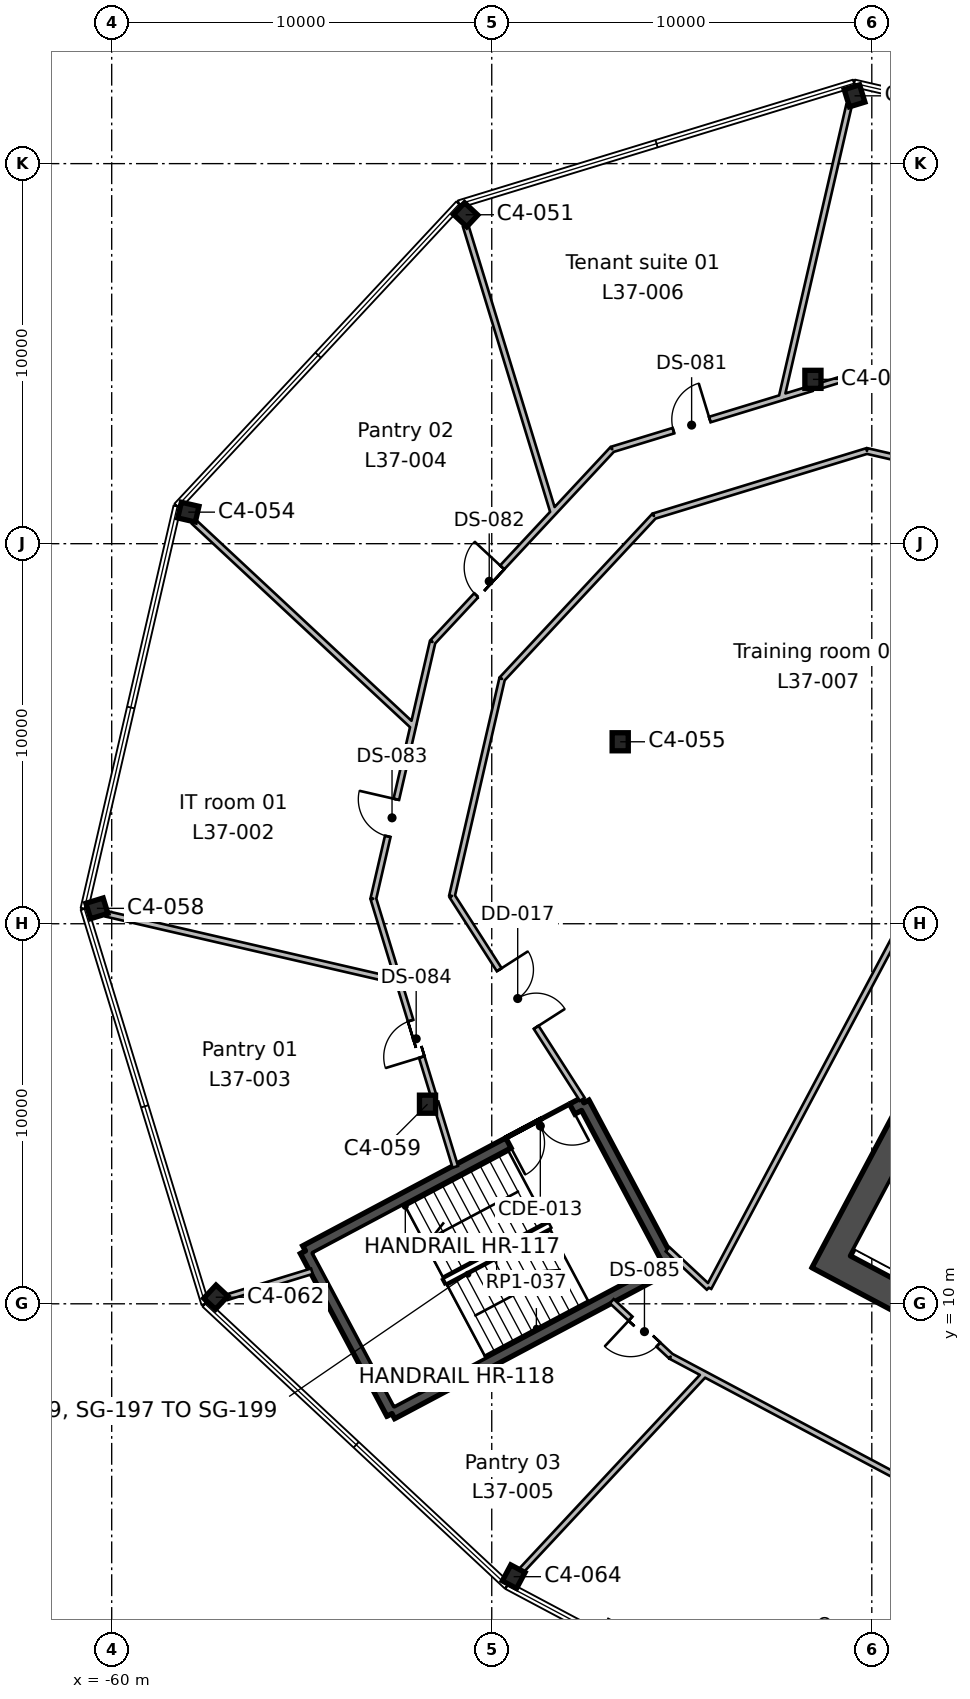
"""IFC4 building model, lengths in metres.
Left out: names, types, materials, properties, quantities, classifications, styles, units other than length and angle.
Written with IfcOpenShell. Run it as: python <this file> out.ifc"""

import sys

from ifc_helpers import new_model, si_unit, direction, frame, frame_2d, origin, origin_2d, place, context, subcontext, project, spatial, rectangle, i_section, extrude, element, fill, save


model = new_model("IFC4")
c1 = context("Model", 3, precision=1e-05, world=origin(), true_north=direction((0.0, 1.0)))
c2 = subcontext(c1, "Body", "Model", "MODEL_VIEW")
j1 = project(units=[si_unit("LENGTHUNIT", "METRE"), si_unit("PLANEANGLEUNIT", "RADIAN")], contexts=[c1])
p1 = place(None, origin())
s1 = spatial("IfcSite", under=j1, at=p1, CompositionType="ELEMENT")
p2 = place(p1, origin())
s2 = spatial("IfcBuilding", under=s1, at=p2, CompositionType="ELEMENT")
p3 = place(p2, frame((0.0, 0.0, 174.2)))
s3 = spatial("IfcBuildingStorey", under=s2, at=p3, CompositionType="ELEMENT", Elevation=174.2)
for number, where, z_axis, x_axis in (
    (1, (-49.423, 2.82, 0.0), (0.0, 0.0, 1.0), (0.883, -0.469, 0.0)),
    (2, (-57.262, 10.173, 0.0), (0.0, 0.0, 1.0), (0.731, -0.682, 0.0)),
    (3, (-51.69, 15.252, 0.0), (0.0, 0.0, 1.0), (1.0, 0.0, 0.0)),
    (4, (-60.39, 20.405, 0.0), (0.0, 0.0, 1.0), (0.292, -0.956, 0.0)),
    (5, (-46.62, 24.788, 0.0), (0.0, 0.0, 1.0), (1.0, 0.0, 0.0)),
    (6, (-57.983, 30.83, 0.0), (0.0, 0.0, 1.0), (-0.225, -0.974, 0.0)),
    (7, (-41.549, 34.324, 0.0), (0.0, 0.0, 1.0), (1.0, 0.0, 0.0)),
    (8, (-50.686, 38.655, 0.0), (0.0, 0.0, 1.0), (-0.682, -0.731, 0.0)),
    (9, (-40.454, 41.784, 0.0), (0.0, 0.0, 1.0), (-0.956, -0.292, 0.0)),
):
    element("IfcColumn", number, at=place(p3, frame(where, z_axis=z_axis, x_axis=x_axis)), inside=s3, PredefinedType="COLUMN", context=c2, shape_type="SweptSolid", body=[
        extrude(i_section(OverallWidth=0.424, OverallDepth=0.475, WebThickness=0.048, FlangeThickness=0.077, FilletRadius=0.015, at=origin_2d()), origin(), (0.0, 0.0, 1.0), 4.0),
    ])
p4 = place(p3, frame((-31.996, 28.168, 0.0), z_axis=(0.0, 0.0, 1.0), x_axis=(-0.469479580143, -0.882943329908, 0.0)))
e10 = element("IfcWall", 10, at=p4, inside=s3, PredefinedType="SHEAR", context=c2, shape_type="SweptSolid", body=[
    extrude(rectangle(XDim=19.7, YDim=0.75, at=frame_2d((9.85, 0.0))), origin(), (0.0, 0.0, 1.0), 4.0),
])
p5 = place(p4, frame((10.45, 0.0, 0.0)))
e11 = element("IfcOpeningElement", 11, at=p5, cuts=e10, PredefinedType="OPENING", context=c2, shape_type="SweptSolid", body=[
    extrude(rectangle(XDim=2.4, YDim=2.4, at=frame_2d((1.2, 1.2))), frame((0.0, 0.385, 0.0), z_axis=(0.0, -1.0, 0.0), x_axis=(1.0, 0.0, 0.0)), (0.0, 0.0, 1.0), 0.77),
])
p6 = place(p3, frame((-22.902, 1.446, 0.0), z_axis=(0.0, 0.0, 1.0), x_axis=(-0.88294509198, 0.469476266226, 0.0)))
e12 = element("IfcWall", 12, at=p6, inside=s3, PredefinedType="SHEAR", context=c2, shape_type="SweptSolid", body=[
    extrude(rectangle(XDim=20.2, YDim=0.75, at=frame_2d((10.1, 0.0))), origin(), (0.0, 0.0, 1.0), 4.0),
])
p7 = place(p3, frame((-47.574, 15.29, 0.0), z_axis=(0.0, 0.0, 1.0), x_axis=(0.469443498566, -0.882962514297, 0.0)))
e13 = element("IfcWall", 13, at=p7, inside=s3, PredefinedType="SHEAR", context=c2, shape_type="SweptSolid", body=[
    extrude(rectangle(XDim=4.85, YDim=0.3, at=frame_2d((2.425, 0.0))), origin(), (0.0, 0.0, 1.0), 4.0),
])
p8 = place(p3, frame((-45.297, 11.007, 0.0), z_axis=(0.0, 0.0, 1.0), x_axis=(-0.882951519127, -0.469464178475, 0.0)))
e14 = element("IfcWall", 14, at=p8, inside=s3, PredefinedType="SHEAR", context=c2, shape_type="SweptSolid", body=[
    extrude(rectangle(XDim=8.3, YDim=0.3, at=frame_2d((4.15, 0.0))), origin(), (0.0, 0.0, 1.0), 4.0),
])
p9 = place(p3, frame((-52.626, 7.111, 0.0), z_axis=(0.0, 0.0, 1.0), x_axis=(-0.469464364128, 0.882951420416, 0.0)))
e15 = element("IfcWall", 15, at=p9, inside=s3, PredefinedType="SHEAR", context=c2, shape_type="SweptSolid", body=[
    extrude(rectangle(XDim=4.85, YDim=0.3, at=frame_2d((2.425, 0.0))), origin(), (0.0, 0.0, 1.0), 4.0),
])
p10 = place(p3, frame((-54.903, 11.393, 0.0), z_axis=(0.0, 0.0, 1.0), x_axis=(0.882939326045, 0.469487110071, 0.0)))
e16 = element("IfcWall", 16, at=p10, inside=s3, PredefinedType="SHEAR", context=c2, shape_type="SweptSolid", body=[
    extrude(rectangle(XDim=8.3, YDim=0.3, at=frame_2d((4.15, 0.0))), origin(), (0.0, 0.0, 1.0), 4.0),
])
p11 = place(p10, frame((6.05, 0.0, 0.0)))
e17 = element("IfcOpeningElement", 17, at=p11, cuts=e16, PredefinedType="OPENING", context=c2, shape_type="SweptSolid", body=[
    extrude(rectangle(XDim=1.9, YDim=2.1, at=frame_2d((0.95, 1.05))), frame((0.0, 0.16, 0.0), z_axis=(0.0, -1.0, 0.0), x_axis=(1.0, 0.0, 0.0)), (0.0, 0.0, 1.0), 0.32),
])
p12 = place(p3, frame((-52.45, 18.484, 0.0), z_axis=(0.0, 0.0, 1.0), x_axis=(-0.974348948829, 0.225042498023, 0.0)))
e18 = element("IfcWall", 18, at=p12, inside=s3, PredefinedType="PARTITIONING", context=c2, shape_type="SweptSolid", body=[
    extrude(rectangle(XDim=7.892, YDim=0.15, at=frame_2d((3.946, 0.0))), origin(), (0.0, 0.0, 1.0), 3.6),
])
p13 = place(p3, frame((-57.841, 30.58, 0.0), z_axis=(0.0, 0.0, 1.0), x_axis=(0.731373012185, -0.681977651428, 0.0)))
e19 = element("IfcWall", 19, at=p13, inside=s3, PredefinedType="PARTITIONING", context=c2, shape_type="SweptSolid", body=[
    extrude(rectangle(XDim=7.893, YDim=0.15, at=frame_2d((3.947, 0.0))), origin(), (0.0, 0.0, 1.0), 3.6),
])
p14 = place(p3, frame((-54.732, 10.857, 0.0), z_axis=(0.0, 0.0, 1.0), x_axis=(-0.956196980242, -0.292723991119, 0.0)))
e20 = element("IfcWall", 20, at=p14, inside=s3, PredefinedType="PARTITIONING", context=c2, shape_type="SweptSolid", body=[
    extrude(rectangle(XDim=2.344, YDim=0.15, at=frame_2d((1.172, 0.0))), origin(), (0.0, 0.0, 1.0), 3.6),
])
p15 = place(p3, frame((-52.056, 25.246, 0.0), z_axis=(0.0, 0.0, 1.0), x_axis=(-0.224961765576, -0.97436759184, 0.0)))
e21 = element("IfcWall", 21, at=p15, inside=s3, PredefinedType="PARTITIONING", context=c2, shape_type="SweptSolid", body=[
    extrude(rectangle(XDim=4.708, YDim=0.15, at=frame_2d((2.354, 0.0))), origin(), (0.0, 0.0, 1.0), 3.6),
])
p16 = place(p15, frame((2.024, 0.0, 0.0)))
e22 = element("IfcOpeningElement", 22, at=p16, cuts=e21, PredefinedType="OPENING", context=c2, shape_type="SweptSolid", body=[
    extrude(rectangle(XDim=1.0, YDim=2.1, at=frame_2d((0.5, 1.05))), frame((0.0, 0.085, 0.0), z_axis=(0.0, -1.0, 0.0), x_axis=(1.0, 0.0, 0.0)), (0.0, 0.0, 1.0), 0.17),
])
p17 = place(p3, frame((-53.115, 20.659, 0.0), z_axis=(0.0, 0.0, 1.0), x_axis=(0.292062202153, -0.956399325634, 0.0)))
e23 = element("IfcWall", 23, at=p17, inside=s3, PredefinedType="PARTITIONING", context=c2, shape_type="SweptSolid", body=[
    extrude(rectangle(XDim=2.222, YDim=0.15, at=frame_2d((1.111, 0.0))), origin(), (0.0, 0.0, 1.0), 3.6),
])
p18 = place(p3, frame((-50.959, 13.604, 0.0), z_axis=(0.0, 0.0, 1.0), x_axis=(-0.292326826569, 0.95631847544, 0.0)))
e24 = element("IfcWall", 24, at=p18, inside=s3, PredefinedType="PARTITIONING", context=c2, shape_type="SweptSolid", body=[
    extrude(rectangle(XDim=1.776, YDim=0.15, at=frame_2d((0.888, 0.0))), origin(), (0.0, 0.0, 1.0), 3.6),
])
p19 = place(p3, frame((-51.535, 15.49, 0.0), z_axis=(0.0, 0.0, 1.0), x_axis=(-0.292522494411, 0.956258641929, 0.0)))
e25 = element("IfcWall", 25, at=p19, inside=s3, PredefinedType="PARTITIONING", context=c2, shape_type="SweptSolid", body=[
    extrude(rectangle(XDim=3.183, YDim=0.15, at=frame_2d((1.592, 0.0))), origin(), (0.0, 0.0, 1.0), 3.6),
])
p20 = place(p19, frame((1.05, 0.0, 0.0)))
e26 = element("IfcOpeningElement", 26, at=p20, cuts=e25, PredefinedType="OPENING", context=c2, shape_type="SweptSolid", body=[
    extrude(rectangle(XDim=1.0, YDim=2.1, at=frame_2d((0.5, 1.05))), frame((0.0, 0.085, 0.0), z_axis=(0.0, -1.0, 0.0), x_axis=(1.0, 0.0, 0.0)), (0.0, 0.0, 1.0), 0.17),
])
p21 = place(p3, frame((-48.345, 30.856, 0.0), z_axis=(0.0, 0.0, 1.0), x_axis=(-0.682044743799, -0.731310445335, 0.0)))
e27 = element("IfcWall", 27, at=p21, inside=s3, PredefinedType="PARTITIONING", context=c2, shape_type="SweptSolid", body=[
    extrude(rectangle(XDim=4.708, YDim=0.15, at=frame_2d((2.354, 0.0))), origin(), (0.0, 0.0, 1.0), 3.6),
])
p22 = place(p21, frame((2.024, 0.0, 0.0)))
e28 = element("IfcOpeningElement", 28, at=p22, cuts=e27, PredefinedType="OPENING", context=c2, shape_type="SweptSolid", body=[
    extrude(rectangle(XDim=1.0, YDim=2.1, at=frame_2d((0.5, 1.05))), frame((0.0, 0.085, 0.0), z_axis=(0.0, -1.0, 0.0), x_axis=(1.0, 0.0, 0.0)), (0.0, 0.0, 1.0), 0.17),
])
p23 = place(p3, frame((-51.556, 27.413, 0.0), z_axis=(0.0, 0.0, 1.0), x_axis=(-0.225019992363, -0.974354146621, 0.0)))
e29 = element("IfcWall", 29, at=p23, inside=s3, PredefinedType="PARTITIONING", context=c2, shape_type="SweptSolid", body=[
    extrude(rectangle(XDim=2.222, YDim=0.15, at=frame_2d((1.111, 0.0))), origin(), (0.0, 0.0, 1.0), 3.6),
])
p24 = place(p3, frame((-50.688, 38.366, 0.0), z_axis=(0.0, 0.0, 1.0), x_axis=(0.292463739097, -0.956276613388, 0.0)))
e30 = element("IfcWall", 30, at=p24, inside=s3, PredefinedType="PARTITIONING", context=c2, shape_type="SweptSolid", body=[
    extrude(rectangle(XDim=7.892, YDim=0.15, at=frame_2d((3.946, 0.0))), origin(), (0.0, 0.0, 1.0), 3.6),
])
p25 = place(p3, frame((-44.402, 8.149, 0.0), z_axis=(0.0, 0.0, 1.0), x_axis=(-0.682039957921, -0.731314908777, 0.0)))
e31 = element("IfcWall", 31, at=p25, inside=s3, PredefinedType="PARTITIONING", context=c2, shape_type="SweptSolid", body=[
    extrude(rectangle(XDim=7.065, YDim=0.15, at=frame_2d((3.533, 0.0))), origin(), (0.0, 0.0, 1.0), 3.6),
])
p26 = place(p3, frame((-42.326, 33.858, 0.0), z_axis=(0.0, 0.0, 1.0), x_axis=(-0.956351168554, -0.292219852858, 0.0)))
e32 = element("IfcWall", 32, at=p26, inside=s3, PredefinedType="PARTITIONING", context=c2, shape_type="SweptSolid", body=[
    extrude(rectangle(XDim=4.709, YDim=0.15, at=frame_2d((2.354, 0.0))), origin(), (0.0, 0.0, 1.0), 3.6),
])
p27 = place(p26, frame((2.025, 0.0, 0.0)))
e33 = element("IfcOpeningElement", 33, at=p27, cuts=e32, PredefinedType="OPENING", context=c2, shape_type="SweptSolid", body=[
    extrude(rectangle(XDim=1.0, YDim=2.1, at=frame_2d((0.5, 1.05))), frame((0.0, 0.085, 0.0), z_axis=(0.0, -1.0, 0.0), x_axis=(1.0, 0.0, 0.0)), (0.0, 0.0, 1.0), 0.17),
])
p28 = place(p3, frame((-46.829, 32.482, 0.0), z_axis=(0.0, 0.0, 1.0), x_axis=(-0.681891349178, -0.731453476249, 0.0)))
e34 = element("IfcWall", 34, at=p28, inside=s3, PredefinedType="PARTITIONING", context=c2, shape_type="SweptSolid", body=[
    extrude(rectangle(XDim=2.222, YDim=0.15, at=frame_2d((1.111, 0.0))), origin(), (0.0, 0.0, 1.0), 3.6),
])
p29 = place(p3, frame((-47.618, 15.38, 0.0), z_axis=(0.0, 0.0, 1.0), x_axis=(-0.539421032188, 0.842036192828, 0.0)))
e35 = element("IfcWall", 35, at=p29, inside=s3, PredefinedType="PARTITIONING", context=c2, shape_type="SweptSolid", body=[
    extrude(rectangle(XDim=6.355, YDim=0.15, at=frame_2d((3.177, 0.0))), origin(), (0.0, 0.0, 1.0), 3.6),
])
p30 = place(p29, frame((2.25, 0.0, 0.0)))
e36 = element("IfcOpeningElement", 36, at=p30, cuts=e35, PredefinedType="OPENING", context=c2, shape_type="SweptSolid", body=[
    extrude(rectangle(XDim=1.8, YDim=2.1, at=frame_2d((0.9, 1.05))), frame((0.0, 0.085, 0.0), z_axis=(0.0, -1.0, 0.0), x_axis=(1.0, 0.0, 0.0)), (0.0, 0.0, 1.0), 0.17),
])
p31 = place(p3, frame((-51.046, 20.731, 0.0), z_axis=(0.0, 0.0, 1.0), x_axis=(0.224889933684, 0.974384173582, 0.0)))
e37 = element("IfcWall", 37, at=p31, inside=s3, PredefinedType="PARTITIONING", context=c2, shape_type="SweptSolid", body=[
    extrude(rectangle(XDim=5.86, YDim=0.15, at=frame_2d((2.93, 0.0))), origin(), (0.0, 0.0, 1.0), 3.6),
])
p32 = place(p3, frame((-49.728, 26.441, 0.0), z_axis=(0.0, 0.0, 1.0), x_axis=(0.682098526533, 0.731260282049, 0.0)))
e38 = element("IfcWall", 38, at=p32, inside=s3, PredefinedType="PARTITIONING", context=c2, shape_type="SweptSolid", body=[
    extrude(rectangle(XDim=5.86, YDim=0.15, at=frame_2d((2.93, 0.0))), origin(), (0.0, 0.0, 1.0), 3.6),
])
p33 = place(p3, frame((-45.731, 30.726, 0.0), z_axis=(0.0, 0.0, 1.0), x_axis=(0.956310804041, 0.292351921619, 0.0)))
e39 = element("IfcWall", 39, at=p33, inside=s3, PredefinedType="PARTITIONING", context=c2, shape_type="SweptSolid", body=[
    extrude(rectangle(XDim=5.859, YDim=0.15, at=frame_2d((2.929, 0.0))), origin(), (0.0, 0.0, 1.0), 3.6),
])
p34 = place(p3, frame((-40.128, 32.439, 0.0), z_axis=(0.0, 0.0, 1.0), x_axis=(0.97437567891, -0.224926735515, 0.0)))
e40 = element("IfcWall", 40, at=p34, inside=s3, PredefinedType="PARTITIONING", context=c2, shape_type="SweptSolid", body=[
    extrude(rectangle(XDim=6.896, YDim=0.15, at=frame_2d((3.448, 0.0))), origin(), (0.0, 0.0, 1.0), 3.6),
])
p35 = place(p3, frame((-33.409, 30.888, 0.0), z_axis=(0.0, 0.0, 1.0), x_axis=(-0.469498189487, -0.882933434676, 0.0)))
e41 = element("IfcWall", 41, at=p35, inside=s3, PredefinedType="PARTITIONING", context=c2, shape_type="SweptSolid", body=[
    extrude(rectangle(XDim=23.176, YDim=0.15, at=frame_2d((11.588, 0.0))), origin(), (0.0, 0.0, 1.0), 3.6),
])
p36 = place(p3, frame((-44.29, 10.425, 0.0), z_axis=(0.0, 0.0, 1.0), x_axis=(-0.731652828982, 0.681677444135, 0.0)))
e42 = element("IfcWall", 42, at=p36, inside=s3, PredefinedType="PARTITIONING", context=c2, shape_type="SweptSolid", body=[
    extrude(rectangle(XDim=1.48, YDim=0.15, at=frame_2d((0.74, 0.0))), origin(), (0.0, 0.0, 1.0), 3.6),
])
p37 = place(p3, frame((-44.462, 8.181, 0.0), z_axis=(0.0, 0.0, 1.0), x_axis=(-0.882750253305, 0.469842516478, 0.0)))
e43 = element("IfcWall", 43, at=p37, inside=s3, PredefinedType="PARTITIONING", context=c2, shape_type="SweptSolid", body=[
    extrude(rectangle(XDim=0.935, YDim=0.15, at=frame_2d((0.467, 0.0))), origin(), (0.0, 0.0, 1.0), 3.6),
])
p38 = place(p3, frame((-45.287, 8.62, 0.0), z_axis=(0.0, 0.0, 1.0), x_axis=(-0.731593637228, 0.681740969846, 0.0)))
e44 = element("IfcWall", 44, at=p38, inside=s3, PredefinedType="PARTITIONING", context=c2, shape_type="SweptSolid", body=[
    extrude(rectangle(XDim=2.125, YDim=0.15, at=frame_2d((1.063, 0.0))), origin(), (0.0, 0.0, 1.0), 3.6),
])
p39 = place(p38, frame((0.45, 0.0, 0.0)))
e45 = element("IfcOpeningElement", 45, at=p39, cuts=e44, PredefinedType="OPENING", context=c2, shape_type="SweptSolid", body=[
    extrude(rectangle(XDim=1.0, YDim=2.1, at=frame_2d((0.5, 1.05))), frame((0.0, 0.085, 0.0), z_axis=(0.0, -1.0, 0.0), x_axis=(1.0, 0.0, 0.0)), (0.0, 0.0, 1.0), 0.17),
])
p40 = place(p3, frame((-13.6, -8.228, 0.0), z_axis=(0.0, 0.0, 1.0), x_axis=(-0.882954510497, 0.469458552369, 0.0)))
e46 = element("IfcWall", 46, at=p40, inside=s3, PredefinedType="PARTITIONING", context=c2, shape_type="SweptSolid", body=[
    extrude(rectangle(XDim=34.953, YDim=0.15, at=frame_2d((17.477, 0.0))), origin(), (0.0, 0.0, 1.0), 3.6),
])
p41 = place(p40, frame((16.55, 0.0, 0.0)))
e47 = element("IfcOpeningElement", 47, at=p41, cuts=e46, PredefinedType="OPENING", context=c2, shape_type="SweptSolid", body=[
    extrude(rectangle(XDim=1.8, YDim=2.1, at=frame_2d((0.9, 1.05))), frame((0.0, 0.085, 0.0), z_axis=(0.0, -1.0, 0.0), x_axis=(1.0, 0.0, 0.0)), (0.0, 0.0, 1.0), 0.17),
])
p42 = place(p40, frame((9.05, 0.0, 0.0)))
e48 = element("IfcOpeningElement", 48, at=p42, cuts=e46, PredefinedType="OPENING", context=c2, shape_type="SweptSolid", body=[
    extrude(rectangle(XDim=1.0, YDim=2.1, at=frame_2d((0.5, 1.05))), frame((0.0, 0.085, 0.0), z_axis=(0.0, -1.0, 0.0), x_axis=(1.0, 0.0, 0.0)), (0.0, 0.0, 1.0), 0.17),
])
p43 = place(p3, frame((-40.599, 41.534, 0.0), z_axis=(0.0, 0.0, 1.0), x_axis=(-0.225013130649, -0.974355731258, 0.0)))
e49 = element("IfcWall", 49, at=p43, inside=s3, PredefinedType="PARTITIONING", context=c2, shape_type="SweptSolid", body=[
    extrude(rectangle(XDim=7.892, YDim=0.15, at=frame_2d((3.946, 0.0))), origin(), (0.0, 0.0, 1.0), 3.6),
])
p44 = place(p3, frame((-34.677, 33.234, 0.0), z_axis=(0.0, 0.0, 1.0), x_axis=(-0.974367234575, 0.224963312978, 0.0)))
e50 = element("IfcWall", 50, at=p44, inside=s3, PredefinedType="PARTITIONING", context=c2, shape_type="SweptSolid", body=[
    extrude(rectangle(XDim=5.668, YDim=0.15, at=frame_2d((2.834, 0.0))), origin(), (0.0, 0.0, 1.0), 3.6),
])
p45 = place(p44, frame((2.35, 0.0, 0.0)))
e51 = element("IfcOpeningElement", 51, at=p45, cuts=e50, PredefinedType="OPENING", context=c2, shape_type="SweptSolid", body=[
    extrude(rectangle(XDim=1.0, YDim=2.1, at=frame_2d((0.5, 1.05))), frame((0.0, 0.085, 0.0), z_axis=(0.0, -1.0, 0.0), x_axis=(1.0, 0.0, 0.0)), (0.0, 0.0, 1.0), 0.17),
])
p46 = place(p3, frame((-40.2, 34.509, 0.0), z_axis=(0.0, 0.0, 1.0), x_axis=(-0.956177669283, -0.29278706386, 0.0)))
e52 = element("IfcWall", 52, at=p46, inside=s3, PredefinedType="PARTITIONING", context=c2, shape_type="SweptSolid", body=[
    extrude(rectangle(XDim=1.189, YDim=0.15, at=frame_2d((0.594, 0.0))), origin(), (0.0, 0.0, 1.0), 3.6),
])
p47 = place(p3, frame((-41.582, 34.087, 0.0), z_axis=(0.0, 0.0, 1.0), x_axis=(-0.956187735772, -0.292754186919, 0.0)))
e53 = element("IfcWall", 53, at=p47, inside=s3, PredefinedType="PARTITIONING", context=c2, shape_type="SweptSolid", body=[
    extrude(rectangle(XDim=0.799, YDim=0.15, at=frame_2d((0.399, 0.0))), origin(), (0.0, 0.0, 1.0), 3.6),
])
p48 = place(p11, frame((1.9, 0.0, 0.0), z_axis=(0.0, 0.0, 1.0), x_axis=(-1.0, 0.0, 0.0)))
e54 = element("IfcDoor", 54, at=p48, inside=s3, OperationType="DOUBLE_DOOR_SINGLE_SWING", PredefinedType="DOOR", context=c2, shape_type="SweptSolid", body=[
    extrude(rectangle(XDim=1.9, YDim=2.1, at=frame_2d((0.95, 1.05))), frame((0.0, 0.025, 0.0), z_axis=(0.0, -1.0, 0.0), x_axis=(1.0, 0.0, 0.0)), (0.0, 0.0, 1.0), 0.05),
])
fill(e17, e54)
p49 = place(p30, frame((1.8, 0.0, 0.0), z_axis=(0.0, 0.0, 1.0), x_axis=(-1.0, 0.0, 0.0)))
e55 = element("IfcDoor", 55, at=p49, inside=s3, OperationType="DOUBLE_DOOR_SINGLE_SWING", PredefinedType="DOOR", context=c2, shape_type="SweptSolid", body=[
    extrude(rectangle(XDim=1.8, YDim=2.1, at=frame_2d((0.9, 1.05))), frame((0.0, 0.025, 0.0), z_axis=(0.0, -1.0, 0.0), x_axis=(1.0, 0.0, 0.0)), (0.0, 0.0, 1.0), 0.05),
])
fill(e36, e55)
p50 = place(p27, frame((1.0, 0.0, 0.0), z_axis=(0.0, 0.0, 1.0), x_axis=(-1.0, 0.0, 0.0)))
e56 = element("IfcDoor", 56, at=p50, inside=s3, OperationType="SINGLE_SWING_RIGHT", PredefinedType="DOOR", context=c2, shape_type="SweptSolid", body=[
    extrude(rectangle(XDim=1.0, YDim=2.1, at=frame_2d((0.5, 1.05))), frame((0.0, 0.025, 0.0), z_axis=(0.0, -1.0, 0.0), x_axis=(1.0, 0.0, 0.0)), (0.0, 0.0, 1.0), 0.05),
])
fill(e33, e56)
p51 = place(p22, frame((1.0, 0.0, 0.0), z_axis=(0.0, 0.0, 1.0), x_axis=(-1.0, 0.0, 0.0)))
e57 = element("IfcDoor", 57, at=p51, inside=s3, OperationType="SINGLE_SWING_RIGHT", PredefinedType="DOOR", context=c2, shape_type="SweptSolid", body=[
    extrude(rectangle(XDim=1.0, YDim=2.1, at=frame_2d((0.5, 1.05))), frame((0.0, 0.025, 0.0), z_axis=(0.0, -1.0, 0.0), x_axis=(1.0, 0.0, 0.0)), (0.0, 0.0, 1.0), 0.05),
])
fill(e28, e57)
p52 = place(p16, frame((1.0, 0.0, 0.0), z_axis=(0.0, 0.0, 1.0), x_axis=(-1.0, 0.0, 0.0)))
e58 = element("IfcDoor", 58, at=p52, inside=s3, OperationType="SINGLE_SWING_RIGHT", PredefinedType="DOOR", context=c2, shape_type="SweptSolid", body=[
    extrude(rectangle(XDim=1.0, YDim=2.1, at=frame_2d((0.5, 1.05))), frame((0.0, 0.025, 0.0), z_axis=(0.0, -1.0, 0.0), x_axis=(1.0, 0.0, 0.0)), (0.0, 0.0, 1.0), 0.05),
])
fill(e22, e58)
p53 = place(p20, origin())
e59 = element("IfcDoor", 59, at=p53, inside=s3, OperationType="SINGLE_SWING_LEFT", PredefinedType="DOOR", context=c2, shape_type="SweptSolid", body=[
    extrude(rectangle(XDim=1.0, YDim=2.1, at=frame_2d((0.5, 1.05))), frame((0.0, 0.025, 0.0), z_axis=(0.0, -1.0, 0.0), x_axis=(1.0, 0.0, 0.0)), (0.0, 0.0, 1.0), 0.05),
])
fill(e26, e59)
p54 = place(p39, origin())
e60 = element("IfcDoor", 60, at=p54, inside=s3, OperationType="SINGLE_SWING_RIGHT", PredefinedType="DOOR", context=c2, shape_type="SweptSolid", body=[
    extrude(rectangle(XDim=1.0, YDim=2.1, at=frame_2d((0.5, 1.05))), frame((0.0, 0.025, 0.0), z_axis=(0.0, -1.0, 0.0), x_axis=(1.0, 0.0, 0.0)), (0.0, 0.0, 1.0), 0.05),
])
fill(e45, e60)
save(model, sys.argv[1])
